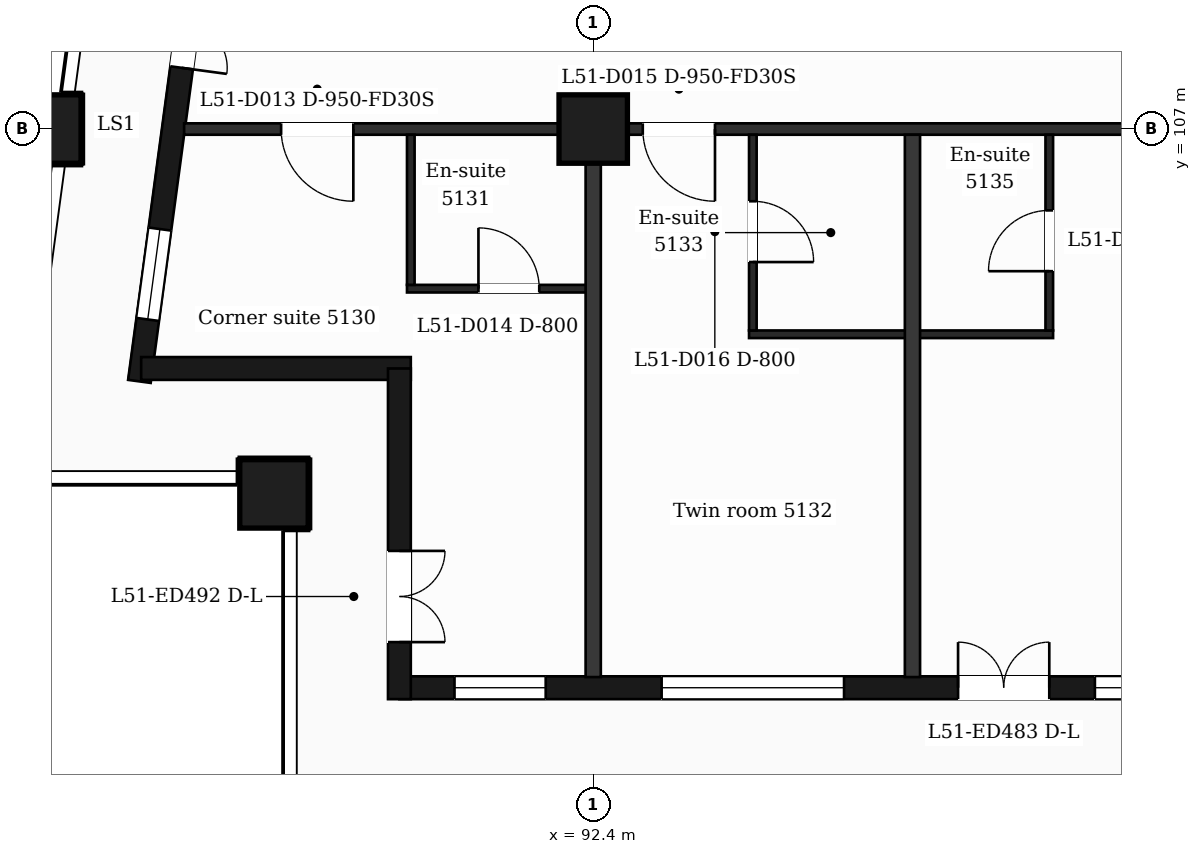
"""IFC4 building model, lengths in metres.
Left out: names, types, materials, properties, quantities, classifications, styles, units other than length and angle.
Written with IfcOpenShell. Run it as: python <this file> out.ifc"""

import sys

from ifc_helpers import new_model, si_unit, direction, frame, frame_2d, origin, origin_2d, place, context, subcontext, project, spatial, rectangle, extrude, element, fill, save


model = new_model("IFC4")
c1 = context("Model", 3, precision=1e-05, world=origin(), true_north=direction((0.0, 1.0)))
c2 = subcontext(c1, "Body", "Model", "MODEL_VIEW")
j1 = project(units=[si_unit("LENGTHUNIT", "METRE"), si_unit("PLANEANGLEUNIT", "RADIAN")], contexts=[c1])
p1 = place(None, origin())
s1 = spatial("IfcSite", under=j1, at=p1, CompositionType="ELEMENT")
p2 = place(p1, origin())
s2 = spatial("IfcBuilding", under=s1, at=p2, CompositionType="ELEMENT")
p3 = place(p2, frame((0.0, 0.0, 213.3)))
s3 = spatial("IfcBuildingStorey", under=s2, at=p3, CompositionType="ELEMENT", Elevation=213.3)
for number, where, z_axis, x_axis in (
    (1, (88.2, 102.2, 0.0), (0.0, 0.0, 1.0), (1.0, 0.0, 0.0)),
    (2, (92.4, 107.0, 0.0), (0.0, 0.0, 1.0), (1.0, 0.0, 0.0)),
    (3, (85.211, 107.0, 0.0), (0.0, 0.0, 1.0), (1.0, 0.0, 0.0)),
):
    element("IfcColumn", number, at=place(p3, frame(where, z_axis=z_axis, x_axis=x_axis)), inside=s3, PredefinedType="COLUMN", context=c2, shape_type="SweptSolid", body=[
        extrude(rectangle(XDim=0.9, YDim=0.9, at=origin_2d()), origin(), (0.0, 0.0, 1.0), 3.7),
    ])
p4 = place(p3, frame((89.85, 99.65, 0.0), z_axis=(0.0, 0.0, 1.0), x_axis=(1.0, 0.0, 0.0)))
e4 = element("IfcWall", 4, at=p4, inside=s3, PredefinedType="SOLIDWALL", context=c2, shape_type="SweptSolid", body=[
    extrude(rectangle(XDim=47.25, YDim=0.3, at=frame_2d((23.625, 0.0))), origin(), (0.0, 0.0, 1.0), 3.38),
])
p5 = place(p4, frame((0.725, 0.0, 0.9)))
e5 = element("IfcOpeningElement", 5, at=p5, cuts=e4, PredefinedType="OPENING", context=c2, shape_type="SweptSolid", body=[
    extrude(rectangle(XDim=1.2, YDim=2.1, at=frame_2d((0.6, 1.05))), frame((0.0, 0.16, 0.0), z_axis=(0.0, -1.0, 0.0), x_axis=(1.0, 0.0, 0.0)), (0.0, 0.0, 1.0), 0.32),
])
p6 = place(p4, frame((3.45, 0.0, 0.9)))
e6 = element("IfcOpeningElement", 6, at=p6, cuts=e4, PredefinedType="OPENING", context=c2, shape_type="SweptSolid", body=[
    extrude(rectangle(XDim=2.4, YDim=2.1, at=frame_2d((1.2, 1.05))), frame((0.0, 0.16, 0.0), z_axis=(0.0, -1.0, 0.0), x_axis=(1.0, 0.0, 0.0)), (0.0, 0.0, 1.0), 0.32),
])
p7 = place(p4, frame((7.35, 0.0, 0.0)))
e7 = element("IfcOpeningElement", 7, at=p7, cuts=e4, PredefinedType="OPENING", context=c2, shape_type="SweptSolid", body=[
    extrude(rectangle(XDim=1.2, YDim=2.4, at=frame_2d((0.6, 1.2))), frame((0.0, 0.16, 0.0), z_axis=(0.0, -1.0, 0.0), x_axis=(1.0, 0.0, 0.0)), (0.0, 0.0, 1.0), 0.32),
])
p8 = place(p4, frame((9.15, 0.0, 0.9)))
e8 = element("IfcOpeningElement", 8, at=p8, cuts=e4, PredefinedType="OPENING", context=c2, shape_type="SweptSolid", body=[
    extrude(rectangle(XDim=1.2, YDim=2.1, at=frame_2d((0.6, 1.05))), frame((0.0, 0.16, 0.0), z_axis=(0.0, -1.0, 0.0), x_axis=(1.0, 0.0, 0.0)), (0.0, 0.0, 1.0), 0.32),
])
p9 = place(p4, frame((11.85, 0.0, 0.9)))
e9 = element("IfcOpeningElement", 9, at=p9, cuts=e4, PredefinedType="OPENING", context=c2, shape_type="SweptSolid", body=[
    extrude(rectangle(XDim=2.4, YDim=2.1, at=frame_2d((1.2, 1.05))), frame((0.0, 0.16, 0.0), z_axis=(0.0, -1.0, 0.0), x_axis=(1.0, 0.0, 0.0)), (0.0, 0.0, 1.0), 0.32),
])
p10 = place(p4, frame((16.05, 0.0, 0.9)))
e10 = element("IfcOpeningElement", 10, at=p10, cuts=e4, PredefinedType="OPENING", context=c2, shape_type="SweptSolid", body=[
    extrude(rectangle(XDim=2.4, YDim=2.1, at=frame_2d((1.2, 1.05))), frame((0.0, 0.16, 0.0), z_axis=(0.0, -1.0, 0.0), x_axis=(1.0, 0.0, 0.0)), (0.0, 0.0, 1.0), 0.32),
])
p11 = place(p4, frame((20.85, 0.0, 0.9)))
e11 = element("IfcOpeningElement", 11, at=p11, cuts=e4, PredefinedType="OPENING", context=c2, shape_type="SweptSolid", body=[
    extrude(rectangle(XDim=1.2, YDim=2.1, at=frame_2d((0.6, 1.05))), frame((0.0, 0.16, 0.0), z_axis=(0.0, -1.0, 0.0), x_axis=(1.0, 0.0, 0.0)), (0.0, 0.0, 1.0), 0.32),
])
p12 = place(p4, frame((25.05, 0.0, 0.9)))
e12 = element("IfcOpeningElement", 12, at=p12, cuts=e4, PredefinedType="OPENING", context=c2, shape_type="SweptSolid", body=[
    extrude(rectangle(XDim=1.2, YDim=2.1, at=frame_2d((0.6, 1.05))), frame((0.0, 0.16, 0.0), z_axis=(0.0, -1.0, 0.0), x_axis=(1.0, 0.0, 0.0)), (0.0, 0.0, 1.0), 0.32),
])
p13 = place(p4, frame((28.65, 0.0, 0.9)))
e13 = element("IfcOpeningElement", 13, at=p13, cuts=e4, PredefinedType="OPENING", context=c2, shape_type="SweptSolid", body=[
    extrude(rectangle(XDim=2.4, YDim=2.1, at=frame_2d((1.2, 1.05))), frame((0.0, 0.16, 0.0), z_axis=(0.0, -1.0, 0.0), x_axis=(1.0, 0.0, 0.0)), (0.0, 0.0, 1.0), 0.32),
])
p14 = place(p4, frame((32.85, 0.0, 0.9)))
e14 = element("IfcOpeningElement", 14, at=p14, cuts=e4, PredefinedType="OPENING", context=c2, shape_type="SweptSolid", body=[
    extrude(rectangle(XDim=2.4, YDim=2.1, at=frame_2d((1.2, 1.05))), frame((0.0, 0.16, 0.0), z_axis=(0.0, -1.0, 0.0), x_axis=(1.0, 0.0, 0.0)), (0.0, 0.0, 1.0), 0.32),
])
p15 = place(p4, frame((37.05, 0.0, 0.9)))
e15 = element("IfcOpeningElement", 15, at=p15, cuts=e4, PredefinedType="OPENING", context=c2, shape_type="SweptSolid", body=[
    extrude(rectangle(XDim=2.4, YDim=2.1, at=frame_2d((1.2, 1.05))), frame((0.0, 0.16, 0.0), z_axis=(0.0, -1.0, 0.0), x_axis=(1.0, 0.0, 0.0)), (0.0, 0.0, 1.0), 0.32),
])
p16 = place(p4, frame((41.25, 0.0, 0.9)))
e16 = element("IfcOpeningElement", 16, at=p16, cuts=e4, PredefinedType="OPENING", context=c2, shape_type="SweptSolid", body=[
    extrude(rectangle(XDim=2.4, YDim=2.1, at=frame_2d((1.2, 1.05))), frame((0.0, 0.16, 0.0), z_axis=(0.0, -1.0, 0.0), x_axis=(1.0, 0.0, 0.0)), (0.0, 0.0, 1.0), 0.32),
])
p17 = place(p4, frame((45.25, 0.0, 0.9)))
e17 = element("IfcOpeningElement", 17, at=p17, cuts=e4, PredefinedType="OPENING", context=c2, shape_type="SweptSolid", body=[
    extrude(rectangle(XDim=1.2, YDim=2.1, at=frame_2d((0.6, 1.05))), frame((0.0, 0.16, 0.0), z_axis=(0.0, -1.0, 0.0), x_axis=(1.0, 0.0, 0.0)), (0.0, 0.0, 1.0), 0.32),
])
p18 = place(p3, frame((87.334, 110.4, 0.0), z_axis=(0.0, 0.0, 1.0), x_axis=(-0.133437175554, -0.991057273915, 0.0)))
e18 = element("IfcWall", 18, at=p18, inside=s3, PredefinedType="SOLIDWALL", context=c2, shape_type="SweptSolid", body=[
    extrude(rectangle(XDim=6.781, YDim=0.3, at=frame_2d((3.39, 0.0))), origin(), (0.0, 0.0, 1.0), 3.38),
])
p19 = place(p18, frame((1.418, 0.0, 0.0)))
e19 = element("IfcOpeningElement", 19, at=p19, cuts=e18, PredefinedType="OPENING", context=c2, shape_type="SweptSolid", body=[
    extrude(rectangle(XDim=1.2, YDim=2.4, at=frame_2d((0.6, 1.2))), frame((0.0, 0.16, 0.0), z_axis=(0.0, -1.0, 0.0), x_axis=(1.0, 0.0, 0.0)), (0.0, 0.0, 1.0), 0.32),
])
p20 = place(p18, frame((4.758, 0.0, 0.9)))
e20 = element("IfcOpeningElement", 20, at=p20, cuts=e18, PredefinedType="OPENING", context=c2, shape_type="SweptSolid", body=[
    extrude(rectangle(XDim=1.2, YDim=2.1, at=frame_2d((0.6, 1.05))), frame((0.0, 0.16, 0.0), z_axis=(0.0, -1.0, 0.0), x_axis=(1.0, 0.0, 0.0)), (0.0, 0.0, 1.0), 0.32),
])
p21 = place(p3, frame((86.452, 103.85, 0.0), z_axis=(0.0, 0.0, 1.0), x_axis=(1.0, 0.0, 0.0)))
e21 = element("IfcWall", 21, at=p21, inside=s3, PredefinedType="SOLIDWALL", context=c2, shape_type="SweptSolid", body=[
    extrude(rectangle(XDim=3.548, YDim=0.3, at=frame_2d((1.774, 0.0))), origin(), (0.0, 0.0, 1.0), 3.38),
])
p22 = place(p3, frame((89.85, 103.85, 0.0), z_axis=(0.0, 0.0, 1.0), x_axis=(0.0, -1.0, 0.0)))
e22 = element("IfcWall", 22, at=p22, inside=s3, PredefinedType="SOLIDWALL", context=c2, shape_type="SweptSolid", body=[
    extrude(rectangle(XDim=4.35, YDim=0.3, at=frame_2d((2.175, 0.0))), origin(), (0.0, 0.0, 1.0), 3.38),
])
p23 = place(p22, frame((2.4, 0.0, 0.0)))
e23 = element("IfcOpeningElement", 23, at=p23, cuts=e22, PredefinedType="OPENING", context=c2, shape_type="SweptSolid", body=[
    extrude(rectangle(XDim=1.2, YDim=2.4, at=frame_2d((0.6, 1.2))), frame((0.0, 0.16, 0.0), z_axis=(0.0, -1.0, 0.0), x_axis=(1.0, 0.0, 0.0)), (0.0, 0.0, 1.0), 0.32),
])
p24 = place(p3, frame((94.45, 104.3, 0.0), z_axis=(0.0, 0.0, 1.0), x_axis=(1.0, 0.0, 0.0)))
e24 = element("IfcWall", 24, at=p24, inside=s3, PredefinedType="PARTITIONING", context=c2, shape_type="SweptSolid", body=[
    extrude(rectangle(XDim=4.0, YDim=0.1, at=frame_2d((2.0, 0.0))), origin(), (0.0, 0.0, 1.0), 3.38),
])
p25 = place(p3, frame((89.95, 104.9, 0.0), z_axis=(0.0, 0.0, 1.0), x_axis=(1.0, 0.0, 0.0)))
e25 = element("IfcWall", 25, at=p25, inside=s3, PredefinedType="PARTITIONING", context=c2, shape_type="SweptSolid", body=[
    extrude(rectangle(XDim=2.45, YDim=0.1, at=frame_2d((1.225, 0.0))), origin(), (0.0, 0.0, 1.0), 3.38),
])
p26 = place(p25, frame((0.94, 0.0, 0.0)))
e26 = element("IfcOpeningElement", 26, at=p26, cuts=e25, PredefinedType="OPENING", context=c2, shape_type="SweptSolid", body=[
    extrude(rectangle(XDim=0.8, YDim=2.1, at=frame_2d((0.4, 1.05))), frame((0.0, 0.06, 0.0), z_axis=(0.0, -1.0, 0.0), x_axis=(1.0, 0.0, 0.0)), (0.0, 0.0, 1.0), 0.12),
])
p27 = place(p3, frame((87.018, 107.0, 0.0), z_axis=(0.0, 0.0, 1.0), x_axis=(1.0, 0.0, 0.0)))
e27 = element("IfcWall", 27, at=p27, inside=s3, PredefinedType="PARTITIONING", context=c2, shape_type="SweptSolid", body=[
    extrude(rectangle(XDim=52.765, YDim=0.15, at=frame_2d((26.382, 0.0))), origin(), (0.0, 0.0, 1.0), 3.38),
])
p28 = place(p27, frame((1.276, 0.0, 0.0)))
e28 = element("IfcOpeningElement", 28, at=p28, cuts=e27, PredefinedType="OPENING", context=c2, shape_type="SweptSolid", body=[
    extrude(rectangle(XDim=0.95, YDim=2.1, at=frame_2d((0.475, 1.05))), frame((0.0, 0.085, 0.0), z_axis=(0.0, -1.0, 0.0), x_axis=(1.0, 0.0, 0.0)), (0.0, 0.0, 1.0), 0.17),
])
p29 = place(p27, frame((6.034, 0.0, 0.0)))
e29 = element("IfcOpeningElement", 29, at=p29, cuts=e27, PredefinedType="OPENING", context=c2, shape_type="SweptSolid", body=[
    extrude(rectangle(XDim=0.95, YDim=2.1, at=frame_2d((0.475, 1.05))), frame((0.0, 0.085, 0.0), z_axis=(0.0, -1.0, 0.0), x_axis=(1.0, 0.0, 0.0)), (0.0, 0.0, 1.0), 0.17),
])
p30 = place(p27, frame((15.445, 0.0, 0.0)))
e30 = element("IfcOpeningElement", 30, at=p30, cuts=e27, PredefinedType="OPENING", context=c2, shape_type="SweptSolid", body=[
    extrude(rectangle(XDim=0.95, YDim=2.1, at=frame_2d((0.475, 1.05))), frame((0.0, 0.085, 0.0), z_axis=(0.0, -1.0, 0.0), x_axis=(1.0, 0.0, 0.0)), (0.0, 0.0, 1.0), 0.17),
])
p31 = place(p27, frame((18.369, 0.0, 0.0)))
e31 = element("IfcOpeningElement", 31, at=p31, cuts=e27, PredefinedType="OPENING", context=c2, shape_type="SweptSolid", body=[
    extrude(rectangle(XDim=0.95, YDim=2.1, at=frame_2d((0.475, 1.05))), frame((0.0, 0.085, 0.0), z_axis=(0.0, -1.0, 0.0), x_axis=(1.0, 0.0, 0.0)), (0.0, 0.0, 1.0), 0.17),
])
p32 = place(p27, frame((24.519, 0.0, 0.0)))
e32 = element("IfcOpeningElement", 32, at=p32, cuts=e27, PredefinedType="OPENING", context=c2, shape_type="SweptSolid", body=[
    extrude(rectangle(XDim=0.95, YDim=2.1, at=frame_2d((0.475, 1.05))), frame((0.0, 0.085, 0.0), z_axis=(0.0, -1.0, 0.0), x_axis=(1.0, 0.0, 0.0)), (0.0, 0.0, 1.0), 0.17),
])
p33 = place(p27, frame((26.632, 0.0, 0.0)))
e33 = element("IfcOpeningElement", 33, at=p33, cuts=e27, PredefinedType="OPENING", context=c2, shape_type="SweptSolid", body=[
    extrude(rectangle(XDim=1.0, YDim=2.1, at=frame_2d((0.5, 1.05))), frame((0.0, 0.085, 0.0), z_axis=(0.0, -1.0, 0.0), x_axis=(1.0, 0.0, 0.0)), (0.0, 0.0, 1.0), 0.17),
])
p34 = place(p27, frame((33.422, 0.0, 0.0)))
e34 = element("IfcOpeningElement", 34, at=p34, cuts=e27, PredefinedType="OPENING", context=c2, shape_type="SweptSolid", body=[
    extrude(rectangle(XDim=0.95, YDim=2.1, at=frame_2d((0.475, 1.05))), frame((0.0, 0.085, 0.0), z_axis=(0.0, -1.0, 0.0), x_axis=(1.0, 0.0, 0.0)), (0.0, 0.0, 1.0), 0.17),
])
p35 = place(p27, frame((35.057, 0.0, 0.0)))
e35 = element("IfcOpeningElement", 35, at=p35, cuts=e27, PredefinedType="OPENING", context=c2, shape_type="SweptSolid", body=[
    extrude(rectangle(XDim=0.95, YDim=2.1, at=frame_2d((0.475, 1.05))), frame((0.0, 0.085, 0.0), z_axis=(0.0, -1.0, 0.0), x_axis=(1.0, 0.0, 0.0)), (0.0, 0.0, 1.0), 0.17),
])
p36 = place(p27, frame((44.532, 0.0, 0.0)))
e36 = element("IfcOpeningElement", 36, at=p36, cuts=e27, PredefinedType="OPENING", context=c2, shape_type="SweptSolid", body=[
    extrude(rectangle(XDim=1.0, YDim=2.1, at=frame_2d((0.5, 1.05))), frame((0.0, 0.085, 0.0), z_axis=(0.0, -1.0, 0.0), x_axis=(1.0, 0.0, 0.0)), (0.0, 0.0, 1.0), 0.17),
])
p37 = place(p27, frame((48.249, 0.0, 0.0)))
e37 = element("IfcOpeningElement", 37, at=p37, cuts=e27, PredefinedType="OPENING", context=c2, shape_type="SweptSolid", body=[
    extrude(rectangle(XDim=0.95, YDim=2.1, at=frame_2d((0.475, 1.05))), frame((0.0, 0.085, 0.0), z_axis=(0.0, -1.0, 0.0), x_axis=(1.0, 0.0, 0.0)), (0.0, 0.0, 1.0), 0.17),
])
p38 = place(p3, frame((90.0, 104.95, 0.0), z_axis=(0.0, 0.0, 1.0), x_axis=(0.0, 1.0, 0.0)))
e38 = element("IfcWall", 38, at=p38, inside=s3, PredefinedType="PARTITIONING", context=c2, shape_type="SweptSolid", body=[
    extrude(rectangle(XDim=1.975, YDim=0.1, at=frame_2d((0.988, 0.0))), origin(), (0.0, 0.0, 1.0), 3.38),
])
p39 = place(p3, frame((92.4, 99.79, 0.0), z_axis=(0.0, 0.0, 1.0), x_axis=(0.0, 1.0, 0.0)))
e39 = element("IfcWall", 39, at=p39, inside=s3, PredefinedType="PARTITIONING", context=c2, shape_type="SweptSolid", body=[
    extrude(rectangle(XDim=7.135, YDim=0.2, at=frame_2d((3.567, 0.0))), origin(), (0.0, 0.0, 1.0), 3.38),
])
p40 = place(p3, frame((94.5, 104.35, 0.0), z_axis=(0.0, 0.0, 1.0), x_axis=(0.0, 1.0, 0.0)))
e40 = element("IfcWall", 40, at=p40, inside=s3, PredefinedType="PARTITIONING", context=c2, shape_type="SweptSolid", body=[
    extrude(rectangle(XDim=2.575, YDim=0.1, at=frame_2d((1.288, 0.0))), origin(), (0.0, 0.0, 1.0), 3.38),
])
p41 = place(p40, frame((0.9, 0.0, 0.0)))
e41 = element("IfcOpeningElement", 41, at=p41, cuts=e40, PredefinedType="OPENING", context=c2, shape_type="SweptSolid", body=[
    extrude(rectangle(XDim=0.8, YDim=2.1, at=frame_2d((0.4, 1.05))), frame((0.0, 0.06, 0.0), z_axis=(0.0, -1.0, 0.0), x_axis=(1.0, 0.0, 0.0)), (0.0, 0.0, 1.0), 0.12),
])
p42 = place(p3, frame((96.6, 99.79, 0.0), z_axis=(0.0, 0.0, 1.0), x_axis=(0.0, 1.0, 0.0)))
e42 = element("IfcWall", 42, at=p42, inside=s3, PredefinedType="PARTITIONING", context=c2, shape_type="SweptSolid", body=[
    extrude(rectangle(XDim=7.135, YDim=0.2, at=frame_2d((3.567, 0.0))), origin(), (0.0, 0.0, 1.0), 3.38),
])
p43 = place(p3, frame((98.4, 104.35, 0.0), z_axis=(0.0, 0.0, 1.0), x_axis=(0.0, 1.0, 0.0)))
e43 = element("IfcWall", 43, at=p43, inside=s3, PredefinedType="PARTITIONING", context=c2, shape_type="SweptSolid", body=[
    extrude(rectangle(XDim=2.575, YDim=0.1, at=frame_2d((1.288, 0.0))), origin(), (0.0, 0.0, 1.0), 3.38),
])
p44 = place(p43, frame((0.78, 0.0, 0.0)))
e44 = element("IfcOpeningElement", 44, at=p44, cuts=e43, PredefinedType="OPENING", context=c2, shape_type="SweptSolid", body=[
    extrude(rectangle(XDim=0.8, YDim=2.1, at=frame_2d((0.4, 1.05))), frame((0.0, 0.06, 0.0), z_axis=(0.0, -1.0, 0.0), x_axis=(1.0, 0.0, 0.0)), (0.0, 0.0, 1.0), 0.12),
])
p45 = place(p5, origin())
e45 = element("IfcWindow", 45, at=p45, inside=s3, PartitioningType="SINGLE_PANEL", PredefinedType="WINDOW", context=c2, shape_type="SweptSolid", body=[
    extrude(rectangle(XDim=1.2, YDim=2.1, at=frame_2d((0.6, 1.05))), frame((0.0, 0.03, 0.0), z_axis=(0.0, -1.0, 0.0), x_axis=(1.0, 0.0, 0.0)), (0.0, 0.0, 1.0), 0.06),
])
fill(e5, e45)
p46 = place(p6, origin())
e46 = element("IfcWindow", 46, at=p46, inside=s3, PartitioningType="SINGLE_PANEL", PredefinedType="WINDOW", context=c2, shape_type="SweptSolid", body=[
    extrude(rectangle(XDim=2.4, YDim=2.1, at=frame_2d((1.2, 1.05))), frame((0.0, 0.03, 0.0), z_axis=(0.0, -1.0, 0.0), x_axis=(1.0, 0.0, 0.0)), (0.0, 0.0, 1.0), 0.06),
])
fill(e6, e46)
p47 = place(p7, origin())
e47 = element("IfcDoor", 47, at=p47, inside=s3, OperationType="DOUBLE_DOOR_SINGLE_SWING", PredefinedType="DOOR", context=c2, shape_type="SweptSolid", body=[
    extrude(rectangle(XDim=1.2, YDim=2.4, at=frame_2d((0.6, 1.2))), frame((0.0, 0.025, 0.0), z_axis=(0.0, -1.0, 0.0), x_axis=(1.0, 0.0, 0.0)), (0.0, 0.0, 1.0), 0.05),
])
fill(e7, e47)
p48 = place(p8, origin())
e48 = element("IfcWindow", 48, at=p48, inside=s3, PartitioningType="SINGLE_PANEL", PredefinedType="WINDOW", context=c2, shape_type="SweptSolid", body=[
    extrude(rectangle(XDim=1.2, YDim=2.1, at=frame_2d((0.6, 1.05))), frame((0.0, 0.03, 0.0), z_axis=(0.0, -1.0, 0.0), x_axis=(1.0, 0.0, 0.0)), (0.0, 0.0, 1.0), 0.06),
])
fill(e8, e48)
p49 = place(p19, origin())
e49 = element("IfcDoor", 49, at=p49, inside=s3, OperationType="DOUBLE_DOOR_SINGLE_SWING", PredefinedType="DOOR", context=c2, shape_type="SweptSolid", body=[
    extrude(rectangle(XDim=1.2, YDim=2.4, at=frame_2d((0.6, 1.2))), frame((0.0, 0.025, 0.0), z_axis=(0.0, -1.0, 0.0), x_axis=(1.0, 0.0, 0.0)), (0.0, 0.0, 1.0), 0.05),
])
fill(e19, e49)
p50 = place(p20, origin())
e50 = element("IfcWindow", 50, at=p50, inside=s3, PartitioningType="SINGLE_PANEL", PredefinedType="WINDOW", context=c2, shape_type="SweptSolid", body=[
    extrude(rectangle(XDim=1.2, YDim=2.1, at=frame_2d((0.6, 1.05))), frame((0.0, 0.03, 0.0), z_axis=(0.0, -1.0, 0.0), x_axis=(1.0, 0.0, 0.0)), (0.0, 0.0, 1.0), 0.06),
])
fill(e20, e50)
p51 = place(p23, origin())
e51 = element("IfcDoor", 51, at=p51, inside=s3, OperationType="DOUBLE_DOOR_SINGLE_SWING", PredefinedType="DOOR", context=c2, shape_type="SweptSolid", body=[
    extrude(rectangle(XDim=1.2, YDim=2.4, at=frame_2d((0.6, 1.2))), frame((0.0, 0.025, 0.0), z_axis=(0.0, -1.0, 0.0), x_axis=(1.0, 0.0, 0.0)), (0.0, 0.0, 1.0), 0.05),
])
fill(e23, e51)
p52 = place(p28, origin())
e52 = element("IfcDoor", 52, at=p52, inside=s3, OperationType="SINGLE_SWING_RIGHT", PredefinedType="DOOR", context=c2, shape_type="SweptSolid", body=[
    extrude(rectangle(XDim=0.95, YDim=2.1, at=frame_2d((0.475, 1.05))), frame((0.0, 0.025, 0.0), z_axis=(0.0, -1.0, 0.0), x_axis=(1.0, 0.0, 0.0)), (0.0, 0.0, 1.0), 0.05),
])
fill(e28, e52)
p53 = place(p26, origin())
e53 = element("IfcDoor", 53, at=p53, inside=s3, OperationType="SINGLE_SWING_LEFT", PredefinedType="DOOR", context=c2, shape_type="SweptSolid", body=[
    extrude(rectangle(XDim=0.8, YDim=2.1, at=frame_2d((0.4, 1.05))), frame((0.0, 0.025, 0.0), z_axis=(0.0, -1.0, 0.0), x_axis=(1.0, 0.0, 0.0)), (0.0, 0.0, 1.0), 0.05),
])
fill(e26, e53)
p54 = place(p29, origin())
e54 = element("IfcDoor", 54, at=p54, inside=s3, OperationType="SINGLE_SWING_RIGHT", PredefinedType="DOOR", context=c2, shape_type="SweptSolid", body=[
    extrude(rectangle(XDim=0.95, YDim=2.1, at=frame_2d((0.475, 1.05))), frame((0.0, 0.025, 0.0), z_axis=(0.0, -1.0, 0.0), x_axis=(1.0, 0.0, 0.0)), (0.0, 0.0, 1.0), 0.05),
])
fill(e29, e54)
p55 = place(p41, origin())
e55 = element("IfcDoor", 55, at=p55, inside=s3, OperationType="SINGLE_SWING_LEFT", PredefinedType="DOOR", context=c2, shape_type="SweptSolid", body=[
    extrude(rectangle(XDim=0.8, YDim=2.1, at=frame_2d((0.4, 1.05))), frame((0.0, 0.025, 0.0), z_axis=(0.0, -1.0, 0.0), x_axis=(1.0, 0.0, 0.0)), (0.0, 0.0, 1.0), 0.05),
])
fill(e41, e55)
p56 = place(p44, origin())
e56 = element("IfcDoor", 56, at=p56, inside=s3, OperationType="SINGLE_SWING_LEFT", PredefinedType="DOOR", context=c2, shape_type="SweptSolid", body=[
    extrude(rectangle(XDim=0.8, YDim=2.1, at=frame_2d((0.4, 1.05))), frame((0.0, 0.025, 0.0), z_axis=(0.0, -1.0, 0.0), x_axis=(1.0, 0.0, 0.0)), (0.0, 0.0, 1.0), 0.05),
])
fill(e44, e56)
save(model, sys.argv[1])
